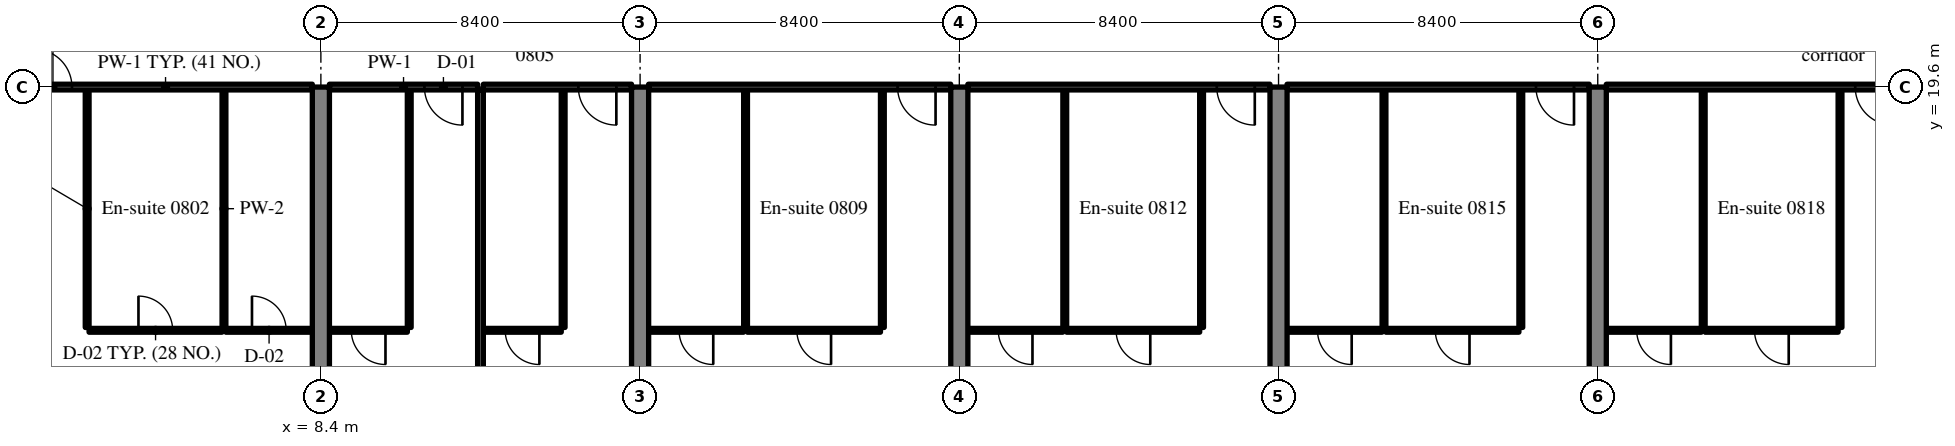
"""IFC4 building model, lengths in metres.
Left out: names, types, materials, properties, quantities, classifications, styles, units other than length and angle.
Written with IfcOpenShell. Run it as: python <this file> out.ifc"""

import sys

from ifc_helpers import new_model, si_unit, direction, frame, frame_2d, origin, place, context, subcontext, project, spatial, rectangle, extrude, source, transform, mapped, element, fill, save


model = new_model("IFC4")
c1 = context("Model", 3, precision=1e-05, world=origin(), true_north=direction((0.0, 1.0)))
c2 = subcontext(c1, "Body", "Model", "MODEL_VIEW")
j1 = project(units=[si_unit("LENGTHUNIT", "METRE"), si_unit("PLANEANGLEUNIT", "RADIAN")], contexts=[c1])
p1 = place(None, origin())
s1 = spatial("IfcSite", under=j1, at=p1, CompositionType="ELEMENT")
p2 = place(p1, origin())
s2 = spatial("IfcBuilding", under=s1, at=p2, CompositionType="ELEMENT")
p3 = place(p2, frame((0.0, 0.0, 39.2)))
s3 = spatial("IfcBuildingStorey", under=s2, at=p3, CompositionType="ELEMENT", Elevation=39.2)
m1 = source(origin(), c2, "Body", "SweptSolid", [
    extrude(rectangle(XDim=19.6, YDim=0.45, at=frame_2d((9.8, 0.0))), origin(), (0.0, 0.0, 1.0), 3.52),
])
for number, where, z_axis, x_axis in (
    (1, (8.4, 0.0, 0.0), (0.0, 0.0, 1.0), (0.0, 1.0, 0.0)),
    (2, (16.8, 0.0, 0.0), (0.0, 0.0, 1.0), (0.0, 1.0, 0.0)),
    (3, (25.2, 0.0, 0.0), (0.0, 0.0, 1.0), (0.0, 1.0, 0.0)),
    (4, (33.6, 0.0, 0.0), (0.0, 0.0, 1.0), (0.0, 1.0, 0.0)),
    (5, (42.0, 0.0, 0.0), (0.0, 0.0, 1.0), (0.0, 1.0, 0.0)),
):
    element("IfcWall", number, at=place(p3, frame(where, z_axis=z_axis, x_axis=x_axis)), inside=s3, PredefinedType="SHEAR", context=c2, shape_type="MappedRepresentation", body=[
        mapped(m1, transform((0.0, 0.0, 0.0), scale=1.0)),
    ])
m2 = source(origin(), c2, "Body", "SweptSolid", [
    extrude(rectangle(XDim=6.25, YDim=0.1, at=frame_2d((3.125, 0.0))), origin(), (0.0, 0.0, 1.0), 3.52),
])
for number, where, z_axis, x_axis in (
    (6, (2.25, 13.275, 0.0), (0.0, 0.0, 1.0), (0.0, 1.0, 0.0)),
    (7, (5.85, 13.275, 0.0), (0.0, 0.0, 1.0), (0.0, 1.0, 0.0)),
):
    element("IfcWall", number, at=place(p3, frame(where, z_axis=z_axis, x_axis=x_axis)), inside=s3, PredefinedType="PARTITIONING", context=c2, shape_type="MappedRepresentation", body=[
        mapped(m2, transform((0.0, 0.0, 0.0), scale=1.0)),
    ])
m3 = source(origin(), c2, "Body", "SweptSolid", [
    extrude(rectangle(XDim=3.5, YDim=0.1, at=frame_2d((1.75, 0.0))), origin(), (0.0, 0.0, 1.0), 3.52),
])
p4 = place(p3, frame((2.3, 13.2, 0.0), z_axis=(0.0, 0.0, 1.0), x_axis=(1.0, 0.0, 0.0)))
e8 = element("IfcWall", 8, at=p4, inside=s3, PredefinedType="PARTITIONING", context=c2, shape_type="MappedRepresentation", body=[
    mapped(m3, transform((0.0, 0.0, 0.0), scale=1.0)),
])
m4 = source(origin(), c2, "Body", "SweptSolid", [
    extrude(rectangle(XDim=0.9, YDim=2.1, at=frame_2d((0.45, 1.05))), frame((0.0, 0.06, 0.0), z_axis=(0.0, -1.0, 0.0), x_axis=(1.0, 0.0, 0.0)), (0.0, 0.0, 1.0), 0.12),
])
p5 = place(p4, frame((1.3, 0.0, 0.0)))
e9 = element("IfcOpeningElement", 9, at=p5, cuts=e8, PredefinedType="OPENING", context=c2, shape_type="MappedRepresentation", body=[
    mapped(m4, transform((0.0, 0.0, 0.0), scale=1.0)),
])
m5 = source(origin(), c2, "Body", "SweptSolid", [
    extrude(rectangle(XDim=2.275, YDim=0.1, at=frame_2d((1.138, 0.0))), origin(), (0.0, 0.0, 1.0), 3.52),
])
p6 = place(p3, frame((5.9, 13.2, 0.0), z_axis=(0.0, 0.0, 1.0), x_axis=(1.0, 0.0, 0.0)))
e10 = element("IfcWall", 10, at=p6, inside=s3, PredefinedType="PARTITIONING", context=c2, shape_type="MappedRepresentation", body=[
    mapped(m5, transform((0.0, 0.0, 0.0), scale=1.0)),
])
p7 = place(p6, frame((0.687, 0.0, 0.0)))
e11 = element("IfcOpeningElement", 11, at=p7, cuts=e10, PredefinedType="OPENING", context=c2, shape_type="MappedRepresentation", body=[
    mapped(m4, transform((0.0, 0.0, 0.0), scale=1.0)),
])
m6 = source(origin(), c2, "Body", "SweptSolid", [
    extrude(rectangle(XDim=7.725, YDim=0.15, at=frame_2d((3.863, 0.0))), origin(), (0.0, 0.0, 1.0), 2.82),
])
p8 = place(p3, frame((0.45, 19.6, 0.0), z_axis=(0.0, 0.0, 1.0), x_axis=(1.0, 0.0, 0.0)))
e12 = element("IfcWall", 12, at=p8, inside=s3, PredefinedType="PARTITIONING", context=c2, shape_type="MappedRepresentation", body=[
    mapped(m6, transform((0.0, 0.0, 0.0), scale=1.0)),
])
m7 = source(origin(), c2, "Body", "SweptSolid", [
    extrude(rectangle(XDim=1.0, YDim=2.1, at=frame_2d((0.5, 1.05))), frame((0.0, 0.085, 0.0), z_axis=(0.0, -1.0, 0.0), x_axis=(1.0, 0.0, 0.0)), (0.0, 0.0, 1.0), 0.17),
])
p9 = place(p8, frame((0.4, 0.0, 0.0)))
e13 = element("IfcOpeningElement", 13, at=p9, cuts=e12, PredefinedType="OPENING", context=c2, shape_type="MappedRepresentation", body=[
    mapped(m7, transform((0.0, 0.0, 0.0), scale=1.0)),
])
p10 = place(p3, frame((10.725, 13.275, 0.0), z_axis=(0.0, 0.0, 1.0), x_axis=(0.0, 1.0, 0.0)))
e14 = element("IfcWall", 14, at=p10, inside=s3, PredefinedType="PARTITIONING", context=c2, shape_type="MappedRepresentation", body=[
    mapped(m2, transform((0.0, 0.0, 0.0), scale=1.0)),
])
m8 = source(origin(), c2, "Body", "SweptSolid", [
    extrude(rectangle(XDim=2.05, YDim=0.1, at=frame_2d((1.025, 0.0))), origin(), (0.0, 0.0, 1.0), 3.52),
])
p11 = place(p3, frame((8.625, 13.2, 0.0), z_axis=(0.0, 0.0, 1.0), x_axis=(1.0, 0.0, 0.0)))
e15 = element("IfcWall", 15, at=p11, inside=s3, PredefinedType="PARTITIONING", context=c2, shape_type="MappedRepresentation", body=[
    mapped(m8, transform((0.0, 0.0, 0.0), scale=1.0)),
])
p12 = place(p11, frame((0.575, 0.0, 0.0)))
e16 = element("IfcOpeningElement", 16, at=p12, cuts=e15, PredefinedType="OPENING", context=c2, shape_type="MappedRepresentation", body=[
    mapped(m4, transform((0.0, 0.0, 0.0), scale=1.0)),
])
m9 = source(origin(), c2, "Body", "SweptSolid", [
    extrude(rectangle(XDim=3.9, YDim=0.15, at=frame_2d((1.95, 0.0))), origin(), (0.0, 0.0, 1.0), 2.82),
])
p13 = place(p3, frame((8.625, 19.6, 0.0), z_axis=(0.0, 0.0, 1.0), x_axis=(1.0, 0.0, 0.0)))
e17 = element("IfcWall", 17, at=p13, inside=s3, PredefinedType="PARTITIONING", context=c2, shape_type="MappedRepresentation", body=[
    mapped(m9, transform((0.0, 0.0, 0.0), scale=1.0)),
])
p14 = place(p13, frame((2.5, 0.0, 0.0)))
e18 = element("IfcOpeningElement", 18, at=p14, cuts=e17, PredefinedType="OPENING", context=c2, shape_type="MappedRepresentation", body=[
    mapped(m7, transform((0.0, 0.0, 0.0), scale=1.0)),
])
p15 = place(p3, frame((14.775, 13.275, 0.0), z_axis=(0.0, 0.0, 1.0), x_axis=(0.0, 1.0, 0.0)))
e19 = element("IfcWall", 19, at=p15, inside=s3, PredefinedType="PARTITIONING", context=c2, shape_type="MappedRepresentation", body=[
    mapped(m2, transform((0.0, 0.0, 0.0), scale=1.0)),
])
p16 = place(p3, frame((12.675, 13.2, 0.0), z_axis=(0.0, 0.0, 1.0), x_axis=(1.0, 0.0, 0.0)))
e20 = element("IfcWall", 20, at=p16, inside=s3, PredefinedType="PARTITIONING", context=c2, shape_type="MappedRepresentation", body=[
    mapped(m8, transform((0.0, 0.0, 0.0), scale=1.0)),
])
p17 = place(p16, frame((0.575, 0.0, 0.0)))
e21 = element("IfcOpeningElement", 21, at=p17, cuts=e20, PredefinedType="OPENING", context=c2, shape_type="MappedRepresentation", body=[
    mapped(m4, transform((0.0, 0.0, 0.0), scale=1.0)),
])
p18 = place(p3, frame((12.675, 19.6, 0.0), z_axis=(0.0, 0.0, 1.0), x_axis=(1.0, 0.0, 0.0)))
e22 = element("IfcWall", 22, at=p18, inside=s3, PredefinedType="PARTITIONING", context=c2, shape_type="MappedRepresentation", body=[
    mapped(m9, transform((0.0, 0.0, 0.0), scale=1.0)),
])
p19 = place(p18, frame((2.5, 0.0, 0.0)))
e23 = element("IfcOpeningElement", 23, at=p19, cuts=e22, PredefinedType="OPENING", context=c2, shape_type="MappedRepresentation", body=[
    mapped(m7, transform((0.0, 0.0, 0.0), scale=1.0)),
])
m10 = source(origin(), c2, "Body", "SweptSolid", [
    extrude(rectangle(XDim=18.625, YDim=0.15, at=frame_2d((9.312, 0.0))), origin(), (0.0, 0.0, 1.0), 3.52),
])
p20 = place(p3, frame((12.6, 0.9, 0.0), z_axis=(0.0, 0.0, 1.0), x_axis=(0.0, 1.0, 0.0)))
e24 = element("IfcWall", 24, at=p20, inside=s3, PredefinedType="PARTITIONING", context=c2, shape_type="MappedRepresentation", body=[
    mapped(m10, transform((0.0, 0.0, 0.0), scale=1.0)),
])
for number, where, z_axis, x_axis in (
    (25, (23.175, 13.275, 0.0), (0.0, 0.0, 1.0), (0.0, 1.0, 0.0)),
    (26, (19.575, 13.275, 0.0), (0.0, 0.0, 1.0), (0.0, 1.0, 0.0)),
):
    element("IfcWall", number, at=place(p3, frame(where, z_axis=z_axis, x_axis=x_axis)), inside=s3, PredefinedType="PARTITIONING", context=c2, shape_type="MappedRepresentation", body=[
        mapped(m2, transform((0.0, 0.0, 0.0), scale=1.0)),
    ])
p21 = place(p3, frame((19.625, 13.2, 0.0), z_axis=(0.0, 0.0, 1.0), x_axis=(1.0, 0.0, 0.0)))
e27 = element("IfcWall", 27, at=p21, inside=s3, PredefinedType="PARTITIONING", context=c2, shape_type="MappedRepresentation", body=[
    mapped(m3, transform((0.0, 0.0, 0.0), scale=1.0)),
])
p22 = place(p21, frame((1.3, 0.0, 0.0)))
e28 = element("IfcOpeningElement", 28, at=p22, cuts=e27, PredefinedType="OPENING", context=c2, shape_type="MappedRepresentation", body=[
    mapped(m4, transform((0.0, 0.0, 0.0), scale=1.0)),
])
m11 = source(origin(), c2, "Body", "SweptSolid", [
    extrude(rectangle(XDim=2.5, YDim=0.1, at=frame_2d((1.25, 0.0))), origin(), (0.0, 0.0, 1.0), 3.52),
])
p23 = place(p3, frame((17.025, 13.2, 0.0), z_axis=(0.0, 0.0, 1.0), x_axis=(1.0, 0.0, 0.0)))
e29 = element("IfcWall", 29, at=p23, inside=s3, PredefinedType="PARTITIONING", context=c2, shape_type="MappedRepresentation", body=[
    mapped(m11, transform((0.0, 0.0, 0.0), scale=1.0)),
])
p24 = place(p23, frame((0.8, 0.0, 0.0)))
e30 = element("IfcOpeningElement", 30, at=p24, cuts=e29, PredefinedType="OPENING", context=c2, shape_type="MappedRepresentation", body=[
    mapped(m4, transform((0.0, 0.0, 0.0), scale=1.0)),
])
m12 = source(origin(), c2, "Body", "SweptSolid", [
    extrude(rectangle(XDim=7.95, YDim=0.15, at=frame_2d((3.975, 0.0))), origin(), (0.0, 0.0, 1.0), 2.82),
])
p25 = place(p3, frame((17.025, 19.6, 0.0), z_axis=(0.0, 0.0, 1.0), x_axis=(1.0, 0.0, 0.0)))
e31 = element("IfcWall", 31, at=p25, inside=s3, PredefinedType="PARTITIONING", context=c2, shape_type="MappedRepresentation", body=[
    mapped(m12, transform((0.0, 0.0, 0.0), scale=1.0)),
])
p26 = place(p25, frame((6.55, 0.0, 0.0)))
e32 = element("IfcOpeningElement", 32, at=p26, cuts=e31, PredefinedType="OPENING", context=c2, shape_type="MappedRepresentation", body=[
    mapped(m7, transform((0.0, 0.0, 0.0), scale=1.0)),
])
for number, where, z_axis, x_axis in (
    (33, (31.575, 13.275, 0.0), (0.0, 0.0, 1.0), (0.0, 1.0, 0.0)),
    (34, (27.975, 13.275, 0.0), (0.0, 0.0, 1.0), (0.0, 1.0, 0.0)),
):
    element("IfcWall", number, at=place(p3, frame(where, z_axis=z_axis, x_axis=x_axis)), inside=s3, PredefinedType="PARTITIONING", context=c2, shape_type="MappedRepresentation", body=[
        mapped(m2, transform((0.0, 0.0, 0.0), scale=1.0)),
    ])
p27 = place(p3, frame((28.025, 13.2, 0.0), z_axis=(0.0, 0.0, 1.0), x_axis=(1.0, 0.0, 0.0)))
e35 = element("IfcWall", 35, at=p27, inside=s3, PredefinedType="PARTITIONING", context=c2, shape_type="MappedRepresentation", body=[
    mapped(m3, transform((0.0, 0.0, 0.0), scale=1.0)),
])
p28 = place(p27, frame((1.3, 0.0, 0.0)))
e36 = element("IfcOpeningElement", 36, at=p28, cuts=e35, PredefinedType="OPENING", context=c2, shape_type="MappedRepresentation", body=[
    mapped(m4, transform((0.0, 0.0, 0.0), scale=1.0)),
])
p29 = place(p3, frame((25.425, 13.2, 0.0), z_axis=(0.0, 0.0, 1.0), x_axis=(1.0, 0.0, 0.0)))
e37 = element("IfcWall", 37, at=p29, inside=s3, PredefinedType="PARTITIONING", context=c2, shape_type="MappedRepresentation", body=[
    mapped(m11, transform((0.0, 0.0, 0.0), scale=1.0)),
])
p30 = place(p29, frame((0.8, 0.0, 0.0)))
e38 = element("IfcOpeningElement", 38, at=p30, cuts=e37, PredefinedType="OPENING", context=c2, shape_type="MappedRepresentation", body=[
    mapped(m4, transform((0.0, 0.0, 0.0), scale=1.0)),
])
m13 = source(origin(), c2, "Body", "SweptSolid", [
    extrude(rectangle(XDim=7.95, YDim=0.15, at=frame_2d((3.975, 0.0))), origin(), (0.0, 0.0, 1.0), 2.82),
])
p31 = place(p3, frame((25.425, 19.6, 0.0), z_axis=(0.0, 0.0, 1.0), x_axis=(1.0, 0.0, 0.0)))
e39 = element("IfcWall", 39, at=p31, inside=s3, PredefinedType="PARTITIONING", context=c2, shape_type="MappedRepresentation", body=[
    mapped(m13, transform((0.0, 0.0, 0.0), scale=1.0)),
])
p32 = place(p31, frame((6.55, 0.0, 0.0)))
e40 = element("IfcOpeningElement", 40, at=p32, cuts=e39, PredefinedType="OPENING", context=c2, shape_type="MappedRepresentation", body=[
    mapped(m7, transform((0.0, 0.0, 0.0), scale=1.0)),
])
for number, where, z_axis, x_axis in (
    (41, (39.975, 13.275, 0.0), (0.0, 0.0, 1.0), (0.0, 1.0, 0.0)),
    (42, (36.375, 13.275, 0.0), (0.0, 0.0, 1.0), (0.0, 1.0, 0.0)),
):
    element("IfcWall", number, at=place(p3, frame(where, z_axis=z_axis, x_axis=x_axis)), inside=s3, PredefinedType="PARTITIONING", context=c2, shape_type="MappedRepresentation", body=[
        mapped(m2, transform((0.0, 0.0, 0.0), scale=1.0)),
    ])
p33 = place(p3, frame((36.425, 13.2, 0.0), z_axis=(0.0, 0.0, 1.0), x_axis=(1.0, 0.0, 0.0)))
e43 = element("IfcWall", 43, at=p33, inside=s3, PredefinedType="PARTITIONING", context=c2, shape_type="MappedRepresentation", body=[
    mapped(m3, transform((0.0, 0.0, 0.0), scale=1.0)),
])
p34 = place(p33, frame((1.3, 0.0, 0.0)))
e44 = element("IfcOpeningElement", 44, at=p34, cuts=e43, PredefinedType="OPENING", context=c2, shape_type="MappedRepresentation", body=[
    mapped(m4, transform((0.0, 0.0, 0.0), scale=1.0)),
])
p35 = place(p3, frame((33.825, 13.2, 0.0), z_axis=(0.0, 0.0, 1.0), x_axis=(1.0, 0.0, 0.0)))
e45 = element("IfcWall", 45, at=p35, inside=s3, PredefinedType="PARTITIONING", context=c2, shape_type="MappedRepresentation", body=[
    mapped(m11, transform((0.0, 0.0, 0.0), scale=1.0)),
])
p36 = place(p35, frame((0.8, 0.0, 0.0)))
e46 = element("IfcOpeningElement", 46, at=p36, cuts=e45, PredefinedType="OPENING", context=c2, shape_type="MappedRepresentation", body=[
    mapped(m4, transform((0.0, 0.0, 0.0), scale=1.0)),
])
p37 = place(p3, frame((33.825, 19.6, 0.0), z_axis=(0.0, 0.0, 1.0), x_axis=(1.0, 0.0, 0.0)))
e47 = element("IfcWall", 47, at=p37, inside=s3, PredefinedType="PARTITIONING", context=c2, shape_type="MappedRepresentation", body=[
    mapped(m13, transform((0.0, 0.0, 0.0), scale=1.0)),
])
p38 = place(p37, frame((6.55, 0.0, 0.0)))
e48 = element("IfcOpeningElement", 48, at=p38, cuts=e47, PredefinedType="OPENING", context=c2, shape_type="MappedRepresentation", body=[
    mapped(m7, transform((0.0, 0.0, 0.0), scale=1.0)),
])
for number, where, z_axis, x_axis in (
    (49, (48.375, 13.275, 0.0), (0.0, 0.0, 1.0), (0.0, 1.0, 0.0)),
    (50, (44.775, 13.275, 0.0), (0.0, 0.0, 1.0), (0.0, 1.0, 0.0)),
):
    element("IfcWall", number, at=place(p3, frame(where, z_axis=z_axis, x_axis=x_axis)), inside=s3, PredefinedType="PARTITIONING", context=c2, shape_type="MappedRepresentation", body=[
        mapped(m2, transform((0.0, 0.0, 0.0), scale=1.0)),
    ])
p39 = place(p3, frame((44.825, 13.2, 0.0), z_axis=(0.0, 0.0, 1.0), x_axis=(1.0, 0.0, 0.0)))
e51 = element("IfcWall", 51, at=p39, inside=s3, PredefinedType="PARTITIONING", context=c2, shape_type="MappedRepresentation", body=[
    mapped(m3, transform((0.0, 0.0, 0.0), scale=1.0)),
])
p40 = place(p39, frame((1.3, 0.0, 0.0)))
e52 = element("IfcOpeningElement", 52, at=p40, cuts=e51, PredefinedType="OPENING", context=c2, shape_type="MappedRepresentation", body=[
    mapped(m4, transform((0.0, 0.0, 0.0), scale=1.0)),
])
p41 = place(p3, frame((42.225, 13.2, 0.0), z_axis=(0.0, 0.0, 1.0), x_axis=(1.0, 0.0, 0.0)))
e53 = element("IfcWall", 53, at=p41, inside=s3, PredefinedType="PARTITIONING", context=c2, shape_type="MappedRepresentation", body=[
    mapped(m11, transform((0.0, 0.0, 0.0), scale=1.0)),
])
p42 = place(p41, frame((0.8, 0.0, 0.0)))
e54 = element("IfcOpeningElement", 54, at=p42, cuts=e53, PredefinedType="OPENING", context=c2, shape_type="MappedRepresentation", body=[
    mapped(m4, transform((0.0, 0.0, 0.0), scale=1.0)),
])
p43 = place(p3, frame((42.225, 19.6, 0.0), z_axis=(0.0, 0.0, 1.0), x_axis=(1.0, 0.0, 0.0)))
e55 = element("IfcWall", 55, at=p43, inside=s3, PredefinedType="PARTITIONING", context=c2, shape_type="MappedRepresentation", body=[
    mapped(m13, transform((0.0, 0.0, 0.0), scale=1.0)),
])
p44 = place(p43, frame((6.55, 0.0, 0.0)))
e56 = element("IfcOpeningElement", 56, at=p44, cuts=e55, PredefinedType="OPENING", context=c2, shape_type="MappedRepresentation", body=[
    mapped(m7, transform((0.0, 0.0, 0.0), scale=1.0)),
])
m14 = source(origin(), c2, "Body", "SweptSolid", [
    extrude(rectangle(XDim=0.9, YDim=2.1, at=frame_2d((0.45, 1.05))), frame((0.0, 0.025, 0.0), z_axis=(0.0, -1.0, 0.0), x_axis=(1.0, 0.0, 0.0)), (0.0, 0.0, 1.0), 0.05),
])
p45 = place(p5, origin())
e57 = element("IfcDoor", 57, at=p45, inside=s3, OperationType="SINGLE_SWING_LEFT", PredefinedType="DOOR", context=c2, shape_type="MappedRepresentation", body=[
    mapped(m14, transform((0.0, 0.0, 0.0), scale=1.0)),
])
fill(e9, e57)
p46 = place(p7, origin())
e58 = element("IfcDoor", 58, at=p46, inside=s3, OperationType="SINGLE_SWING_LEFT", PredefinedType="DOOR", context=c2, shape_type="MappedRepresentation", body=[
    mapped(m14, transform((0.0, 0.0, 0.0), scale=1.0)),
])
fill(e11, e58)
m15 = source(origin(), c2, "Body", "SweptSolid", [
    extrude(rectangle(XDim=1.0, YDim=2.1, at=frame_2d((0.5, 1.05))), frame((0.0, 0.025, 0.0), z_axis=(0.0, -1.0, 0.0), x_axis=(1.0, 0.0, 0.0)), (0.0, 0.0, 1.0), 0.05),
])
p47 = place(p9, origin())
e59 = element("IfcDoor", 59, at=p47, inside=s3, OperationType="SINGLE_SWING_LEFT", PredefinedType="DOOR", context=c2, shape_type="MappedRepresentation", body=[
    mapped(m15, transform((0.0, 0.0, 0.0), scale=1.0)),
])
fill(e13, e59)
p48 = place(p12, origin())
e60 = element("IfcDoor", 60, at=p48, inside=s3, OperationType="SINGLE_SWING_RIGHT", PredefinedType="DOOR", context=c2, shape_type="MappedRepresentation", body=[
    mapped(m14, transform((0.0, 0.0, 0.0), scale=1.0)),
])
fill(e16, e60)
p49 = place(p14, origin())
e61 = element("IfcDoor", 61, at=p49, inside=s3, OperationType="SINGLE_SWING_RIGHT", PredefinedType="DOOR", context=c2, shape_type="MappedRepresentation", body=[
    mapped(m15, transform((0.0, 0.0, 0.0), scale=1.0)),
])
fill(e18, e61)
p50 = place(p17, origin())
e62 = element("IfcDoor", 62, at=p50, inside=s3, OperationType="SINGLE_SWING_RIGHT", PredefinedType="DOOR", context=c2, shape_type="MappedRepresentation", body=[
    mapped(m14, transform((0.0, 0.0, 0.0), scale=1.0)),
])
fill(e21, e62)
p51 = place(p19, origin())
e63 = element("IfcDoor", 63, at=p51, inside=s3, OperationType="SINGLE_SWING_RIGHT", PredefinedType="DOOR", context=c2, shape_type="MappedRepresentation", body=[
    mapped(m15, transform((0.0, 0.0, 0.0), scale=1.0)),
])
fill(e23, e63)
p52 = place(p22, origin())
e64 = element("IfcDoor", 64, at=p52, inside=s3, OperationType="SINGLE_SWING_RIGHT", PredefinedType="DOOR", context=c2, shape_type="MappedRepresentation", body=[
    mapped(m14, transform((0.0, 0.0, 0.0), scale=1.0)),
])
fill(e28, e64)
p53 = place(p24, origin())
e65 = element("IfcDoor", 65, at=p53, inside=s3, OperationType="SINGLE_SWING_RIGHT", PredefinedType="DOOR", context=c2, shape_type="MappedRepresentation", body=[
    mapped(m14, transform((0.0, 0.0, 0.0), scale=1.0)),
])
fill(e30, e65)
p54 = place(p26, origin())
e66 = element("IfcDoor", 66, at=p54, inside=s3, OperationType="SINGLE_SWING_RIGHT", PredefinedType="DOOR", context=c2, shape_type="MappedRepresentation", body=[
    mapped(m15, transform((0.0, 0.0, 0.0), scale=1.0)),
])
fill(e32, e66)
p55 = place(p28, origin())
e67 = element("IfcDoor", 67, at=p55, inside=s3, OperationType="SINGLE_SWING_RIGHT", PredefinedType="DOOR", context=c2, shape_type="MappedRepresentation", body=[
    mapped(m14, transform((0.0, 0.0, 0.0), scale=1.0)),
])
fill(e36, e67)
p56 = place(p30, origin())
e68 = element("IfcDoor", 68, at=p56, inside=s3, OperationType="SINGLE_SWING_RIGHT", PredefinedType="DOOR", context=c2, shape_type="MappedRepresentation", body=[
    mapped(m14, transform((0.0, 0.0, 0.0), scale=1.0)),
])
fill(e38, e68)
p57 = place(p32, origin())
e69 = element("IfcDoor", 69, at=p57, inside=s3, OperationType="SINGLE_SWING_RIGHT", PredefinedType="DOOR", context=c2, shape_type="MappedRepresentation", body=[
    mapped(m15, transform((0.0, 0.0, 0.0), scale=1.0)),
])
fill(e40, e69)
p58 = place(p34, origin())
e70 = element("IfcDoor", 70, at=p58, inside=s3, OperationType="SINGLE_SWING_RIGHT", PredefinedType="DOOR", context=c2, shape_type="MappedRepresentation", body=[
    mapped(m14, transform((0.0, 0.0, 0.0), scale=1.0)),
])
fill(e44, e70)
p59 = place(p36, origin())
e71 = element("IfcDoor", 71, at=p59, inside=s3, OperationType="SINGLE_SWING_RIGHT", PredefinedType="DOOR", context=c2, shape_type="MappedRepresentation", body=[
    mapped(m14, transform((0.0, 0.0, 0.0), scale=1.0)),
])
fill(e46, e71)
p60 = place(p38, origin())
e72 = element("IfcDoor", 72, at=p60, inside=s3, OperationType="SINGLE_SWING_RIGHT", PredefinedType="DOOR", context=c2, shape_type="MappedRepresentation", body=[
    mapped(m15, transform((0.0, 0.0, 0.0), scale=1.0)),
])
fill(e48, e72)
p61 = place(p40, origin())
e73 = element("IfcDoor", 73, at=p61, inside=s3, OperationType="SINGLE_SWING_RIGHT", PredefinedType="DOOR", context=c2, shape_type="MappedRepresentation", body=[
    mapped(m14, transform((0.0, 0.0, 0.0), scale=1.0)),
])
fill(e52, e73)
p62 = place(p42, origin())
e74 = element("IfcDoor", 74, at=p62, inside=s3, OperationType="SINGLE_SWING_RIGHT", PredefinedType="DOOR", context=c2, shape_type="MappedRepresentation", body=[
    mapped(m14, transform((0.0, 0.0, 0.0), scale=1.0)),
])
fill(e54, e74)
p63 = place(p44, origin())
e75 = element("IfcDoor", 75, at=p63, inside=s3, OperationType="SINGLE_SWING_RIGHT", PredefinedType="DOOR", context=c2, shape_type="MappedRepresentation", body=[
    mapped(m15, transform((0.0, 0.0, 0.0), scale=1.0)),
])
fill(e56, e75)
save(model, sys.argv[1])
